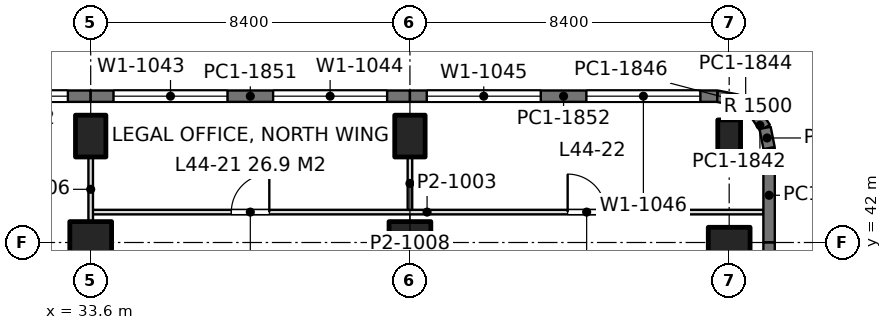
"""IFC4 building model, lengths in metres.
Left out: names, types, materials, properties, quantities, classifications, styles, units other than length and angle.
Written with IfcOpenShell. Run it as: python <this file> out.ifc"""

import sys

from ifc_helpers import new_model, si_unit, direction, frame, frame_2d, origin, origin_2d, place, context, subcontext, project, spatial, rectangle, extrude, element, fill, save


model = new_model("IFC4")
c1 = context("Model", 3, precision=1e-05, world=origin(), true_north=direction((0.0, 1.0)))
c2 = subcontext(c1, "Body", "Model", "MODEL_VIEW")
j1 = project(units=[si_unit("LENGTHUNIT", "METRE"), si_unit("PLANEANGLEUNIT", "RADIAN")], contexts=[c1])
p1 = place(None, origin())
s1 = spatial("IfcSite", under=j1, at=p1, CompositionType="ELEMENT")
p2 = place(p1, origin())
s2 = spatial("IfcBuilding", under=s1, at=p2, CompositionType="ELEMENT")
p3 = place(p2, frame((0.0, 0.0, 194.4)))
s3 = spatial("IfcBuildingStorey", under=s2, at=p3, CompositionType="ELEMENT", Elevation=194.4)
p4 = place(p3, frame((33.6, 42.0, 0.0), z_axis=(0.0, 0.0, 1.0), x_axis=(1.0, 0.0, 0.0)))
e1 = element("IfcColumn", 1, at=p4, inside=s3, PredefinedType="COLUMN", context=c2, shape_type="SweptSolid", body=[
    extrude(rectangle(XDim=1.1, YDim=1.1, at=origin_2d()), origin(), (0.0, 0.0, 1.0), 4.2),
])
p5 = place(p3, frame((33.6, 44.8, 0.0), z_axis=(0.0, 0.0, 1.0), x_axis=(1.0, 0.0, 0.0)))
e2 = element("IfcColumn", 2, at=p5, inside=s3, PredefinedType="COLUMN", context=c2, shape_type="SweptSolid", body=[
    extrude(rectangle(XDim=0.8, YDim=1.1, at=origin_2d()), origin(), (0.0, 0.0, 1.0), 4.2),
])
p6 = place(p3, frame((42.0, 42.0, 0.0), z_axis=(0.0, 0.0, 1.0), x_axis=(1.0, 0.0, 0.0)))
e3 = element("IfcColumn", 3, at=p6, inside=s3, PredefinedType="COLUMN", context=c2, shape_type="SweptSolid", body=[
    extrude(rectangle(XDim=1.1, YDim=1.1, at=origin_2d()), origin(), (0.0, 0.0, 1.0), 4.2),
])
for number, where, z_axis, x_axis in (
    (4, (42.0, 44.8, 0.0), (0.0, 0.0, 1.0), (1.0, 0.0, 0.0)),
    (5, (50.4, 42.0, 0.0), (0.0, 0.0, 1.0), (0.0, 1.0, 0.0)),
):
    element("IfcColumn", number, at=place(p3, frame(where, z_axis=z_axis, x_axis=x_axis)), inside=s3, PredefinedType="COLUMN", context=c2, shape_type="SweptSolid", body=[
        extrude(rectangle(XDim=0.8, YDim=1.1, at=origin_2d()), origin(), (0.0, 0.0, 1.0), 4.2),
    ])
p7 = place(p3, frame((50.4, 44.8, 0.0), z_axis=(0.0, 0.0, 1.0), x_axis=(1.0, 0.0, 0.0)))
e6 = element("IfcColumn", 6, at=p7, inside=s3, PredefinedType="COLUMN", context=c2, shape_type="SweptSolid", body=[
    extrude(rectangle(XDim=0.6, YDim=0.85, at=origin_2d()), origin(), (0.0, 0.0, 1.0), 4.2),
])
p8 = place(p3, frame((25.2, 45.85, 0.0), z_axis=(0.0, 0.0, 1.0), x_axis=(1.0, 0.0, 0.0)))
e7 = element("IfcWall", 7, at=p8, inside=s3, PredefinedType="SOLIDWALL", context=c2, shape_type="SweptSolid", body=[
    extrude(rectangle(XDim=8.4, YDim=0.3, at=frame_2d((4.2, 0.0))), origin(), (0.0, 0.0, 1.0), 4.05),
])
p9 = place(p8, frame((0.6, 0.0, 0.9)))
e8 = element("IfcOpeningElement", 8, at=p9, cuts=e7, PredefinedType="OPENING", context=c2, shape_type="SweptSolid", body=[
    extrude(rectangle(XDim=3.0, YDim=1.9, at=frame_2d((1.5, 0.95))), frame((0.0, 0.16, 0.0), z_axis=(0.0, -1.0, 0.0), x_axis=(1.0, 0.0, 0.0)), (0.0, 0.0, 1.0), 0.32),
])
p10 = place(p8, frame((4.8, 0.0, 0.9)))
e9 = element("IfcOpeningElement", 9, at=p10, cuts=e7, PredefinedType="OPENING", context=c2, shape_type="SweptSolid", body=[
    extrude(rectangle(XDim=3.0, YDim=1.9, at=frame_2d((1.5, 0.95))), frame((0.0, 0.16, 0.0), z_axis=(0.0, -1.0, 0.0), x_axis=(1.0, 0.0, 0.0)), (0.0, 0.0, 1.0), 0.32),
])
p11 = place(p3, frame((33.6, 45.85, 0.0), z_axis=(0.0, 0.0, 1.0), x_axis=(1.0, 0.0, 0.0)))
e10 = element("IfcWall", 10, at=p11, inside=s3, PredefinedType="SOLIDWALL", context=c2, shape_type="SweptSolid", body=[
    extrude(rectangle(XDim=8.4, YDim=0.3, at=frame_2d((4.2, 0.0))), origin(), (0.0, 0.0, 1.0), 4.05),
])
p12 = place(p11, frame((0.6, 0.0, 0.9)))
e11 = element("IfcOpeningElement", 11, at=p12, cuts=e10, PredefinedType="OPENING", context=c2, shape_type="SweptSolid", body=[
    extrude(rectangle(XDim=3.0, YDim=1.9, at=frame_2d((1.5, 0.95))), frame((0.0, 0.16, 0.0), z_axis=(0.0, -1.0, 0.0), x_axis=(1.0, 0.0, 0.0)), (0.0, 0.0, 1.0), 0.32),
])
p13 = place(p11, frame((4.8, 0.0, 0.9)))
e12 = element("IfcOpeningElement", 12, at=p13, cuts=e10, PredefinedType="OPENING", context=c2, shape_type="SweptSolid", body=[
    extrude(rectangle(XDim=3.0, YDim=1.9, at=frame_2d((1.5, 0.95))), frame((0.0, 0.16, 0.0), z_axis=(0.0, -1.0, 0.0), x_axis=(1.0, 0.0, 0.0)), (0.0, 0.0, 1.0), 0.32),
])
p14 = place(p3, frame((42.0, 45.85, 0.0), z_axis=(0.0, 0.0, 1.0), x_axis=(1.0, 0.0, 0.0)))
e13 = element("IfcWall", 13, at=p14, inside=s3, PredefinedType="SOLIDWALL", context=c2, shape_type="SweptSolid", body=[
    extrude(rectangle(XDim=8.085, YDim=0.3, at=frame_2d((4.042, 0.0))), origin(), (0.0, 0.0, 1.0), 4.05),
])
p15 = place(p14, frame((0.443, 0.0, 0.9)))
e14 = element("IfcOpeningElement", 14, at=p15, cuts=e13, PredefinedType="OPENING", context=c2, shape_type="SweptSolid", body=[
    extrude(rectangle(XDim=3.0, YDim=1.9, at=frame_2d((1.5, 0.95))), frame((0.0, 0.16, 0.0), z_axis=(0.0, -1.0, 0.0), x_axis=(1.0, 0.0, 0.0)), (0.0, 0.0, 1.0), 0.32),
])
p16 = place(p14, frame((4.643, 0.0, 0.9)))
e15 = element("IfcOpeningElement", 15, at=p16, cuts=e13, PredefinedType="OPENING", context=c2, shape_type="SweptSolid", body=[
    extrude(rectangle(XDim=3.0, YDim=1.9, at=frame_2d((1.5, 0.95))), frame((0.0, 0.16, 0.0), z_axis=(0.0, -1.0, 0.0), x_axis=(1.0, 0.0, 0.0)), (0.0, 0.0, 1.0), 0.32),
])
p17 = place(p3, frame((50.085, 45.85, 0.0), z_axis=(0.0, 0.0, 1.0), x_axis=(0.980702050465, -0.1955082817, 0.0)))
e16 = element("IfcWall", 16, at=p17, inside=s3, PredefinedType="SOLIDWALL", context=c2, shape_type="SweptSolid", body=[
    extrude(rectangle(XDim=0.541, YDim=0.3, at=frame_2d((0.271, 0.0))), origin(), (0.0, 0.0, 1.0), 4.05),
])
p18 = place(p3, frame((50.615, 45.744, 0.0), z_axis=(0.0, 0.0, 1.0), x_axis=(0.831692711774, -0.555236195849, 0.0)))
e17 = element("IfcWall", 17, at=p18, inside=s3, PredefinedType="SOLIDWALL", context=c2, shape_type="SweptSolid", body=[
    extrude(rectangle(XDim=0.525, YDim=0.3, at=frame_2d((0.263, 0.0))), origin(), (0.0, 0.0, 1.0), 4.05),
])
p19 = place(p3, frame((51.052, 45.453, 0.0), z_axis=(0.0, 0.0, 1.0), x_axis=(0.55534295404, -0.831621430339, 0.0)))
e18 = element("IfcWall", 18, at=p19, inside=s3, PredefinedType="SOLIDWALL", context=c2, shape_type="SweptSolid", body=[
    extrude(rectangle(XDim=0.526, YDim=0.3, at=frame_2d((0.263, 0.0))), origin(), (0.0, 0.0, 1.0), 4.05),
])
p20 = place(p3, frame((51.344, 45.015, 0.0), z_axis=(0.0, 0.0, 1.0), x_axis=(0.195073962632, -0.980788534345, 0.0)))
e19 = element("IfcWall", 19, at=p20, inside=s3, PredefinedType="SOLIDWALL", context=c2, shape_type="SweptSolid", body=[
    extrude(rectangle(XDim=0.541, YDim=0.3, at=frame_2d((0.271, 0.0))), origin(), (0.0, 0.0, 1.0), 4.05),
])
p21 = place(p3, frame((51.45, 44.485, 0.0), z_axis=(0.0, 0.0, 1.0), x_axis=(0.0, -1.0, 0.0)))
e20 = element("IfcWall", 20, at=p21, inside=s3, PredefinedType="SOLIDWALL", context=c2, shape_type="SweptSolid", body=[
    extrude(rectangle(XDim=2.485, YDim=0.3, at=frame_2d((1.243, 0.0))), origin(), (0.0, 0.0, 1.0), 4.05),
])
p22 = place(p3, frame((51.45, 42.0, 0.0), z_axis=(0.0, 0.0, 1.0), x_axis=(0.0, -1.0, 0.0)))
e21 = element("IfcWall", 21, at=p22, inside=s3, PredefinedType="SOLIDWALL", context=c2, shape_type="SweptSolid", body=[
    extrude(rectangle(XDim=4.275, YDim=0.3, at=frame_2d((2.137, 0.0))), origin(), (0.0, 0.0, 1.0), 4.05),
])
p23 = place(p22, frame((0.938, 0.0, 0.9)))
e22 = element("IfcOpeningElement", 22, at=p23, cuts=e21, PredefinedType="OPENING", context=c2, shape_type="SweptSolid", body=[
    extrude(rectangle(XDim=2.4, YDim=1.9, at=frame_2d((1.2, 0.95))), frame((0.0, 0.16, 0.0), z_axis=(0.0, -1.0, 0.0), x_axis=(1.0, 0.0, 0.0)), (0.0, 0.0, 1.0), 0.32),
])
p24 = place(p3, frame((33.6, 42.8, 0.0), z_axis=(0.0, 0.0, 1.0), x_axis=(1.0, 0.0, 0.0)))
e23 = element("IfcWall", 23, at=p24, inside=s3, PredefinedType="PARTITIONING", context=c2, shape_type="SweptSolid", body=[
    extrude(rectangle(XDim=17.702, YDim=0.12, at=frame_2d((8.851, 0.0))), origin(), (0.0, 0.0, 1.0), 3.56),
])
p25 = place(p24, frame((3.7, 0.0, 0.0)))
e24 = element("IfcOpeningElement", 24, at=p25, cuts=e23, PredefinedType="OPENING", context=c2, shape_type="SweptSolid", body=[
    extrude(rectangle(XDim=1.0, YDim=2.4, at=frame_2d((0.5, 1.2))), frame((0.0, 0.07, 0.0), z_axis=(0.0, -1.0, 0.0), x_axis=(1.0, 0.0, 0.0)), (0.0, 0.0, 1.0), 0.14),
])
p26 = place(p24, frame((12.55, 0.0, 0.0)))
e25 = element("IfcOpeningElement", 25, at=p26, cuts=e23, PredefinedType="OPENING", context=c2, shape_type="SweptSolid", body=[
    extrude(rectangle(XDim=1.0, YDim=2.4, at=frame_2d((0.5, 1.2))), frame((0.0, 0.07, 0.0), z_axis=(0.0, -1.0, 0.0), x_axis=(1.0, 0.0, 0.0)), (0.0, 0.0, 1.0), 0.14),
])
p27 = place(p3, frame((33.6, 42.548, 0.0), z_axis=(0.0, 0.0, 1.0), x_axis=(0.0, 1.0, 0.0)))
e26 = element("IfcWall", 26, at=p27, inside=s3, PredefinedType="PARTITIONING", context=c2, shape_type="SweptSolid", body=[
    extrude(rectangle(XDim=1.703, YDim=0.12, at=frame_2d((0.852, 0.0))), origin(), (0.0, 0.0, 1.0), 3.69),
])
p28 = place(p3, frame((42.0, 42.858, 0.0), z_axis=(0.0, 0.0, 1.0), x_axis=(0.0, 1.0, 0.0)))
e27 = element("IfcWall", 27, at=p28, inside=s3, PredefinedType="PARTITIONING", context=c2, shape_type="SweptSolid", body=[
    extrude(rectangle(XDim=1.393, YDim=0.12, at=frame_2d((0.697, 0.0))), origin(), (0.0, 0.0, 1.0), 3.69),
])
p29 = place(p10, origin())
e28 = element("IfcWindow", 28, at=p29, inside=s3, PartitioningType="SINGLE_PANEL", PredefinedType="WINDOW", context=c2, shape_type="SweptSolid", body=[
    extrude(rectangle(XDim=3.0, YDim=1.9, at=frame_2d((1.5, 0.95))), frame((0.0, 0.03, 0.0), z_axis=(0.0, -1.0, 0.0), x_axis=(1.0, 0.0, 0.0)), (0.0, 0.0, 1.0), 0.06),
])
fill(e9, e28)
p30 = place(p12, origin())
e29 = element("IfcWindow", 29, at=p30, inside=s3, PartitioningType="SINGLE_PANEL", PredefinedType="WINDOW", context=c2, shape_type="SweptSolid", body=[
    extrude(rectangle(XDim=3.0, YDim=1.9, at=frame_2d((1.5, 0.95))), frame((0.0, 0.03, 0.0), z_axis=(0.0, -1.0, 0.0), x_axis=(1.0, 0.0, 0.0)), (0.0, 0.0, 1.0), 0.06),
])
fill(e11, e29)
p31 = place(p13, origin())
e30 = element("IfcWindow", 30, at=p31, inside=s3, PartitioningType="SINGLE_PANEL", PredefinedType="WINDOW", context=c2, shape_type="SweptSolid", body=[
    extrude(rectangle(XDim=3.0, YDim=1.9, at=frame_2d((1.5, 0.95))), frame((0.0, 0.03, 0.0), z_axis=(0.0, -1.0, 0.0), x_axis=(1.0, 0.0, 0.0)), (0.0, 0.0, 1.0), 0.06),
])
fill(e12, e30)
p32 = place(p15, origin())
e31 = element("IfcWindow", 31, at=p32, inside=s3, PartitioningType="SINGLE_PANEL", PredefinedType="WINDOW", context=c2, shape_type="SweptSolid", body=[
    extrude(rectangle(XDim=3.0, YDim=1.9, at=frame_2d((1.5, 0.95))), frame((0.0, 0.03, 0.0), z_axis=(0.0, -1.0, 0.0), x_axis=(1.0, 0.0, 0.0)), (0.0, 0.0, 1.0), 0.06),
])
fill(e14, e31)
p33 = place(p16, origin())
e32 = element("IfcWindow", 32, at=p33, inside=s3, PartitioningType="SINGLE_PANEL", PredefinedType="WINDOW", context=c2, shape_type="SweptSolid", body=[
    extrude(rectangle(XDim=3.0, YDim=1.9, at=frame_2d((1.5, 0.95))), frame((0.0, 0.03, 0.0), z_axis=(0.0, -1.0, 0.0), x_axis=(1.0, 0.0, 0.0)), (0.0, 0.0, 1.0), 0.06),
])
fill(e15, e32)
p34 = place(p25, origin())
e33 = element("IfcDoor", 33, at=p34, inside=s3, OperationType="SINGLE_SWING_RIGHT", PredefinedType="DOOR", context=c2, shape_type="SweptSolid", body=[
    extrude(rectangle(XDim=1.0, YDim=2.4, at=frame_2d((0.5, 1.2))), frame((0.0, 0.025, 0.0), z_axis=(0.0, -1.0, 0.0), x_axis=(1.0, 0.0, 0.0)), (0.0, 0.0, 1.0), 0.05),
])
fill(e24, e33)
p35 = place(p26, origin())
e34 = element("IfcDoor", 34, at=p35, inside=s3, OperationType="SINGLE_SWING_LEFT", PredefinedType="DOOR", context=c2, shape_type="SweptSolid", body=[
    extrude(rectangle(XDim=1.0, YDim=2.4, at=frame_2d((0.5, 1.2))), frame((0.0, 0.025, 0.0), z_axis=(0.0, -1.0, 0.0), x_axis=(1.0, 0.0, 0.0)), (0.0, 0.0, 1.0), 0.05),
])
fill(e25, e34)
save(model, sys.argv[1])
